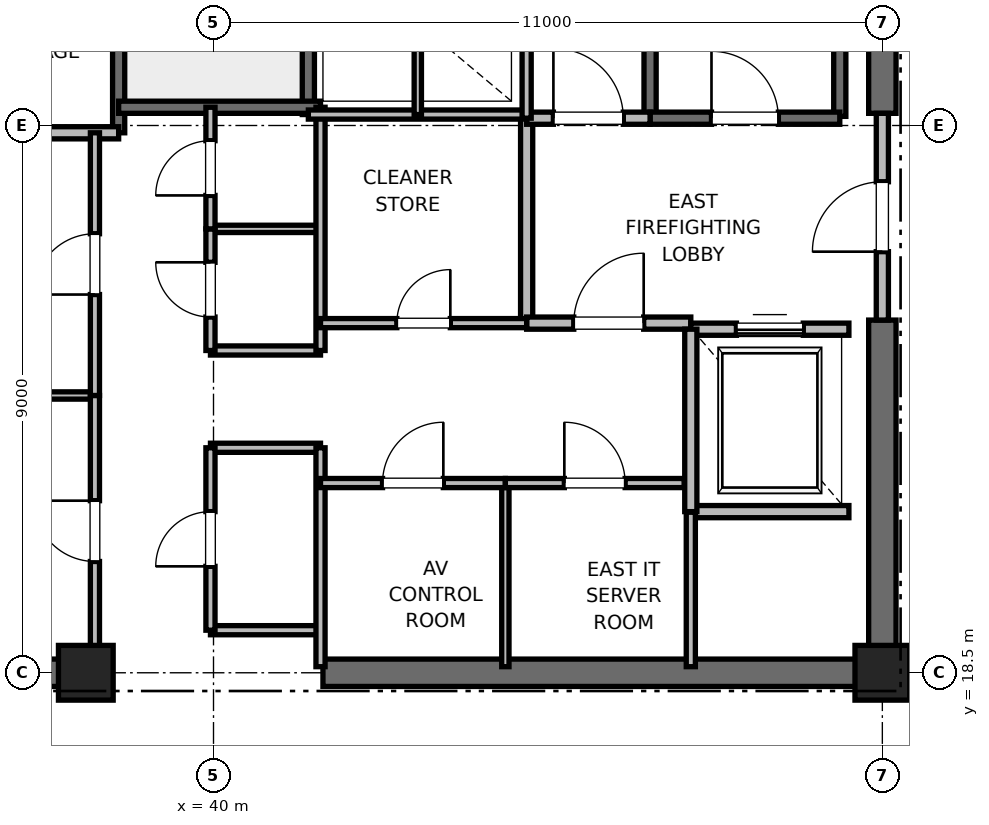
"""IFC4 building model, lengths in metres.
Left out: names, types, materials, properties, quantities, classifications, styles, units other than length and angle.
Written with IfcOpenShell. Run it as: python <this file> out.ifc"""

import sys

from ifc_helpers import new_model, si_unit, direction, frame, frame_2d, origin, origin_2d, place, context, subcontext, project, spatial, rectangle, extrude, element, fill, save


model = new_model("IFC4")
c1 = context("Model", 3, precision=1e-05, world=origin(), true_north=direction((0.0, 1.0)))
c2 = subcontext(c1, "Body", "Model", "MODEL_VIEW")
j1 = project(units=[si_unit("LENGTHUNIT", "METRE"), si_unit("PLANEANGLEUNIT", "RADIAN")], contexts=[c1])
p1 = place(None, origin())
s1 = spatial("IfcSite", under=j1, at=p1, CompositionType="ELEMENT")
p2 = place(p1, origin())
s2 = spatial("IfcBuilding", under=s1, at=p2, CompositionType="ELEMENT")
p3 = place(p2, frame((0.0, 0.0, 243.2)))
s3 = spatial("IfcBuildingStorey", under=s2, at=p3, CompositionType="ELEMENT", Elevation=243.2)
for number, where, z_axis, x_axis in (
    (1, (51.0, 18.5, 0.0), (0.0, 0.0, 1.0), (1.0, 0.0, 0.0)),
    (2, (37.9, 18.5, 0.0), (0.0, 0.0, 1.0), (1.0, 0.0, 0.0)),
):
    element("IfcColumn", number, at=place(p3, frame(where, z_axis=z_axis, x_axis=x_axis)), inside=s3, PredefinedType="PILASTER", context=c2, shape_type="SweptSolid", body=[
        extrude(rectangle(XDim=0.9, YDim=0.9, at=origin_2d()), origin(), (0.0, 0.0, 1.0), 4.0),
    ])
for number, where, z_axis, x_axis in (
    (3, (29.0, 18.5, 0.0), (0.0, 0.0, 1.0), (1.0, 0.0, 0.0)),
    (4, (41.8, 18.5, 0.0), (0.0, 0.0, 1.0), (1.0, 0.0, 0.0)),
):
    element("IfcWall", number, at=place(p3, frame(where, z_axis=z_axis, x_axis=x_axis)), inside=s3, PredefinedType="SHEAR", context=c2, shape_type="SweptSolid", body=[
        extrude(rectangle(XDim=9.2, YDim=0.45, at=frame_2d((4.6, 0.0))), origin(), (0.0, 0.0, 1.0), 3.785),
    ])
p4 = place(p3, frame((51.0, 18.5, 0.0), z_axis=(0.0, 0.0, 1.0), x_axis=(0.0, 1.0, 0.0)))
e5 = element("IfcWall", 5, at=p4, inside=s3, PredefinedType="SHEAR", context=c2, shape_type="SweptSolid", body=[
    extrude(rectangle(XDim=5.8, YDim=0.45, at=frame_2d((2.9, 0.0))), origin(), (0.0, 0.0, 1.0), 3.785),
])
p5 = place(p3, frame((51.0, 27.7, 0.0), z_axis=(0.0, 0.0, 1.0), x_axis=(0.0, 1.0, 0.0)))
e6 = element("IfcWall", 6, at=p5, inside=s3, PredefinedType="SHEAR", context=c2, shape_type="SweptSolid", body=[
    extrude(rectangle(XDim=8.8, YDim=0.45, at=frame_2d((4.4, 0.0))), origin(), (0.0, 0.0, 1.0), 3.785),
])
p6 = place(p3, frame((50.3, 27.65, 0.0), z_axis=(0.0, 0.0, 1.0), x_axis=(0.0, 1.0, 0.0)))
e7 = element("IfcWall", 7, at=p6, inside=s3, PredefinedType="SOLIDWALL", context=c2, shape_type="SweptSolid", body=[
    extrude(rectangle(XDim=8.15, YDim=0.2, at=frame_2d((4.075, 0.0))), origin(), (0.0, 0.0, 1.0), 3.785),
])
p7 = place(p3, frame((47.18, 27.62, 0.0), z_axis=(0.0, 0.0, 1.0), x_axis=(0.0, 1.0, 0.0)))
e8 = element("IfcWall", 8, at=p7, inside=s3, PredefinedType="SOLIDWALL", context=c2, shape_type="SweptSolid", body=[
    extrude(rectangle(XDim=8.18, YDim=0.2, at=frame_2d((4.09, 0.0))), origin(), (0.0, 0.0, 1.0), 3.785),
])
p8 = place(p3, frame((47.18, 27.62, 0.0), z_axis=(0.0, 0.0, 1.0), x_axis=(1.0, 0.0, 0.0)))
e9 = element("IfcWall", 9, at=p8, inside=s3, PredefinedType="SOLIDWALL", context=c2, shape_type="SweptSolid", body=[
    extrude(rectangle(XDim=3.12, YDim=0.2, at=frame_2d((1.56, 0.0))), origin(), (0.0, 0.0, 1.0), 3.785),
])
p9 = place(p8, frame((1.01, 0.0, 0.0)))
e10 = element("IfcOpeningElement", 10, at=p9, cuts=e9, PredefinedType="OPENING", context=c2, shape_type="SweptSolid", body=[
    extrude(rectangle(XDim=1.1, YDim=2.15, at=frame_2d((0.55, 1.075))), frame((0.0, 0.1, 0.0), z_axis=(0.0, -1.0, 0.0), x_axis=(1.0, 0.0, 0.0)), (0.0, 0.0, 1.0), 0.2),
])
p10 = place(p3, frame((38.44, 27.38, 0.0), z_axis=(0.0, 0.0, 1.0), x_axis=(0.0, 1.0, 0.0)))
e11 = element("IfcWall", 11, at=p10, inside=s3, PredefinedType="SOLIDWALL", context=c2, shape_type="SweptSolid", body=[
    extrude(rectangle(XDim=8.87, YDim=0.2, at=frame_2d((4.435, 0.0))), origin(), (0.0, 0.0, 1.0), 3.785),
])
p11 = place(p3, frame((41.56, 27.68, 0.0), z_axis=(0.0, 0.0, 1.0), x_axis=(0.0, 1.0, 0.0)))
e12 = element("IfcWall", 12, at=p11, inside=s3, PredefinedType="SOLIDWALL", context=c2, shape_type="SweptSolid", body=[
    extrude(rectangle(XDim=8.57, YDim=0.2, at=frame_2d((4.285, 0.0))), origin(), (0.0, 0.0, 1.0), 3.785),
])
p12 = place(p3, frame((38.44, 27.8, 0.0), z_axis=(0.0, 0.0, 1.0), x_axis=(1.0, 0.0, 0.0)))
e13 = element("IfcWall", 13, at=p12, inside=s3, PredefinedType="SOLIDWALL", context=c2, shape_type="SweptSolid", body=[
    extrude(rectangle(XDim=3.32, YDim=0.2, at=frame_2d((1.66, 0.0))), origin(), (0.0, 0.0, 1.0), 3.785),
])
p13 = place(p3, frame((32.82, 27.38, 0.0), z_axis=(0.0, 0.0, 1.0), x_axis=(1.0, 0.0, 0.0)))
e14 = element("IfcWall", 14, at=p13, inside=s3, PredefinedType="PARTITIONING", context=c2, shape_type="SweptSolid", body=[
    extrude(rectangle(XDim=5.62, YDim=0.2, at=frame_2d((2.81, 0.0))), origin(), (0.0, 0.0, 1.0), 3.785),
])
p14 = place(p3, frame((45.15, 24.25, 0.0), z_axis=(0.0, 0.0, 1.0), x_axis=(0.0, 1.0, 0.0)))
e15 = element("IfcWall", 15, at=p14, inside=s3, PredefinedType="PARTITIONING", context=c2, shape_type="SweptSolid", body=[
    extrude(rectangle(XDim=3.37, YDim=0.2, at=frame_2d((1.685, 0.0))), origin(), (0.0, 0.0, 1.0), 3.785),
])
p15 = place(p3, frame((45.15, 24.25, 0.0), z_axis=(0.0, 0.0, 1.0), x_axis=(1.0, 0.0, 0.0)))
e16 = element("IfcWall", 16, at=p15, inside=s3, PredefinedType="PARTITIONING", context=c2, shape_type="SweptSolid", body=[
    extrude(rectangle(XDim=2.7, YDim=0.2, at=frame_2d((1.35, 0.0))), origin(), (0.0, 0.0, 1.0), 3.785),
])
p16 = place(p15, frame((0.775, 0.0, 0.0)))
e17 = element("IfcOpeningElement", 17, at=p16, cuts=e16, PredefinedType="OPENING", context=c2, shape_type="SweptSolid", body=[
    extrude(rectangle(XDim=1.15, YDim=2.2, at=frame_2d((0.575, 1.1))), frame((0.0, 0.1, 0.0), z_axis=(0.0, -1.0, 0.0), x_axis=(1.0, 0.0, 0.0)), (0.0, 0.0, 1.0), 0.2),
])
p17 = place(p3, frame((45.15, 27.62, 0.0), z_axis=(0.0, 0.0, 1.0), x_axis=(1.0, 0.0, 0.0)))
e18 = element("IfcWall", 18, at=p17, inside=s3, PredefinedType="PARTITIONING", context=c2, shape_type="SweptSolid", body=[
    extrude(rectangle(XDim=2.03, YDim=0.2, at=frame_2d((1.015, 0.0))), origin(), (0.0, 0.0, 1.0), 3.785),
])
p18 = place(p17, frame((0.44, 0.0, 0.0)))
e19 = element("IfcOpeningElement", 19, at=p18, cuts=e18, PredefinedType="OPENING", context=c2, shape_type="SweptSolid", body=[
    extrude(rectangle(XDim=1.15, YDim=2.2, at=frame_2d((0.575, 1.1))), frame((0.0, 0.1, 0.0), z_axis=(0.0, -1.0, 0.0), x_axis=(1.0, 0.0, 0.0)), (0.0, 0.0, 1.0), 0.2),
])
p19 = place(p3, frame((51.0, 24.3, 0.0), z_axis=(0.0, 0.0, 1.0), x_axis=(0.0, 1.0, 0.0)))
e20 = element("IfcWall", 20, at=p19, inside=s3, PredefinedType="PARTITIONING", context=c2, shape_type="SweptSolid", body=[
    extrude(rectangle(XDim=3.4, YDim=0.2, at=frame_2d((1.7, 0.0))), origin(), (0.0, 0.0, 1.0), 2.865),
])
p20 = place(p19, frame((1.125, 0.0, 0.0)))
e21 = element("IfcOpeningElement", 21, at=p20, cuts=e20, PredefinedType="OPENING", context=c2, shape_type="SweptSolid", body=[
    extrude(rectangle(XDim=1.15, YDim=2.2, at=frame_2d((0.575, 1.1))), frame((0.0, 0.1, 0.0), z_axis=(0.0, -1.0, 0.0), x_axis=(1.0, 0.0, 0.0)), (0.0, 0.0, 1.0), 0.2),
])
p21 = place(p3, frame((47.85, 21.15, 0.0), z_axis=(0.0, 0.0, 1.0), x_axis=(1.0, 0.0, 0.0)))
e22 = element("IfcWall", 22, at=p21, inside=s3, PredefinedType="SOLIDWALL", context=c2, shape_type="SweptSolid", body=[
    extrude(rectangle(XDim=2.6, YDim=0.2, at=frame_2d((1.3, 0.0))), origin(), (0.0, 0.0, 1.0), 3.785),
])
p22 = place(p3, frame((50.45, 24.15, 0.0), z_axis=(0.0, 0.0, 1.0), x_axis=(-1.0, 0.0, 0.0)))
e23 = element("IfcWall", 23, at=p22, inside=s3, PredefinedType="SOLIDWALL", context=c2, shape_type="SweptSolid", body=[
    extrude(rectangle(XDim=2.6, YDim=0.2, at=frame_2d((1.3, 0.0))), origin(), (0.0, 0.0, 1.0), 2.865),
])
p23 = place(p22, frame((0.75, 0.0, 0.0)))
e24 = element("IfcOpeningElement", 24, at=p23, cuts=e23, PredefinedType="OPENING", context=c2, shape_type="SweptSolid", body=[
    extrude(rectangle(XDim=1.1, YDim=2.2, at=frame_2d((0.55, 1.1))), frame((0.0, 0.1, 0.0), z_axis=(0.0, -1.0, 0.0), x_axis=(1.0, 0.0, 0.0)), (0.0, 0.0, 1.0), 0.2),
])
p24 = place(p3, frame((47.85, 24.15, 0.0), z_axis=(0.0, 0.0, 1.0), x_axis=(0.0, -1.0, 0.0)))
e25 = element("IfcWall", 25, at=p24, inside=s3, PredefinedType="SOLIDWALL", context=c2, shape_type="SweptSolid", body=[
    extrude(rectangle(XDim=3.0, YDim=0.2, at=frame_2d((1.5, 0.0))), origin(), (0.0, 0.0, 1.0), 3.785),
])
for number, where, z_axis, x_axis in (
    (26, (39.95, 19.2, 0.0), (0.0, 0.0, 1.0), (1.0, 0.0, 0.0)),
    (27, (39.95, 22.2, 0.0), (0.0, 0.0, 1.0), (1.0, 0.0, 0.0)),
    (28, (39.95, 23.8, 0.0), (0.0, 0.0, 1.0), (1.0, 0.0, 0.0)),
):
    element("IfcWall", number, at=place(p3, frame(where, z_axis=z_axis, x_axis=x_axis)), inside=s3, PredefinedType="PARTITIONING", context=c2, shape_type="SweptSolid", body=[
        extrude(rectangle(XDim=1.81, YDim=0.15, at=frame_2d((0.905, 0.0))), origin(), (0.0, 0.0, 1.0), 2.85),
    ])
p25 = place(p3, frame((39.95, 25.8, 0.0), z_axis=(0.0, 0.0, 1.0), x_axis=(1.0, 0.0, 0.0)))
e29 = element("IfcWall", 29, at=p25, inside=s3, PredefinedType="PARTITIONING", context=c2, shape_type="SweptSolid", body=[
    extrude(rectangle(XDim=1.81, YDim=0.12, at=frame_2d((0.905, 0.0))), origin(), (0.0, 0.0, 1.0), 2.85),
])
p26 = place(p3, frame((41.76, 18.6, 0.0), z_axis=(0.0, 0.0, 1.0), x_axis=(0.0, 1.0, 0.0)))
e30 = element("IfcWall", 30, at=p26, inside=s3, PredefinedType="PARTITIONING", context=c2, shape_type="SweptSolid", body=[
    extrude(rectangle(XDim=3.6, YDim=0.15, at=frame_2d((1.8, 0.0))), origin(), (0.0, 0.0, 1.0), 2.85),
])
p27 = place(p3, frame((41.76, 23.8, 0.0), z_axis=(0.0, 0.0, 1.0), x_axis=(0.0, 1.0, 0.0)))
e31 = element("IfcWall", 31, at=p27, inside=s3, PredefinedType="PARTITIONING", context=c2, shape_type="SweptSolid", body=[
    extrude(rectangle(XDim=4.0, YDim=0.15, at=frame_2d((2.0, 0.0))), origin(), (0.0, 0.0, 1.0), 2.85),
])
p28 = place(p3, frame((39.95, 19.2, 0.0), z_axis=(0.0, 0.0, 1.0), x_axis=(0.0, 1.0, 0.0)))
e32 = element("IfcWall", 32, at=p28, inside=s3, PredefinedType="PARTITIONING", context=c2, shape_type="SweptSolid", body=[
    extrude(rectangle(XDim=3.0, YDim=0.15, at=frame_2d((1.5, 0.0))), origin(), (0.0, 0.0, 1.0), 2.85),
])
p29 = place(p28, frame((1.05, 0.0, 0.0)))
e33 = element("IfcOpeningElement", 33, at=p29, cuts=e32, PredefinedType="OPENING", context=c2, shape_type="SweptSolid", body=[
    extrude(rectangle(XDim=0.9, YDim=2.1, at=frame_2d((0.45, 1.05))), frame((0.0, 0.075, 0.0), z_axis=(0.0, -1.0, 0.0), x_axis=(1.0, 0.0, 0.0)), (0.0, 0.0, 1.0), 0.15),
])
p30 = place(p3, frame((39.95, 23.8, 0.0), z_axis=(0.0, 0.0, 1.0), x_axis=(0.0, 1.0, 0.0)))
e34 = element("IfcWall", 34, at=p30, inside=s3, PredefinedType="PARTITIONING", context=c2, shape_type="SweptSolid", body=[
    extrude(rectangle(XDim=2.0, YDim=0.15, at=frame_2d((1.0, 0.0))), origin(), (0.0, 0.0, 1.0), 2.85),
])
p31 = place(p30, frame((0.55, 0.0, 0.0)))
e35 = element("IfcOpeningElement", 35, at=p31, cuts=e34, PredefinedType="OPENING", context=c2, shape_type="SweptSolid", body=[
    extrude(rectangle(XDim=0.9, YDim=2.1, at=frame_2d((0.45, 1.05))), frame((0.0, 0.075, 0.0), z_axis=(0.0, -1.0, 0.0), x_axis=(1.0, 0.0, 0.0)), (0.0, 0.0, 1.0), 0.15),
])
p32 = place(p3, frame((39.95, 25.8, 0.0), z_axis=(0.0, 0.0, 1.0), x_axis=(0.0, 1.0, 0.0)))
e36 = element("IfcWall", 36, at=p32, inside=s3, PredefinedType="PARTITIONING", context=c2, shape_type="SweptSolid", body=[
    extrude(rectangle(XDim=2.0, YDim=0.15, at=frame_2d((1.0, 0.0))), origin(), (0.0, 0.0, 1.0), 2.85),
])
p33 = place(p32, frame((0.55, 0.0, 0.0)))
e37 = element("IfcOpeningElement", 37, at=p33, cuts=e36, PredefinedType="OPENING", context=c2, shape_type="SweptSolid", body=[
    extrude(rectangle(XDim=0.9, YDim=2.1, at=frame_2d((0.45, 1.05))), frame((0.0, 0.075, 0.0), z_axis=(0.0, -1.0, 0.0), x_axis=(1.0, 0.0, 0.0)), (0.0, 0.0, 1.0), 0.15),
])
p34 = place(p3, frame((32.82, 23.06, 0.0), z_axis=(0.0, 0.0, 1.0), x_axis=(1.0, 0.0, 0.0)))
e38 = element("IfcWall", 38, at=p34, inside=s3, PredefinedType="PARTITIONING", context=c2, shape_type="SweptSolid", body=[
    extrude(rectangle(XDim=5.23, YDim=0.12, at=frame_2d((2.615, 0.0))), origin(), (0.0, 0.0, 1.0), 2.85),
])
p35 = place(p3, frame((38.05, 18.6, 0.0), z_axis=(0.0, 0.0, 1.0), x_axis=(0.0, 1.0, 0.0)))
e39 = element("IfcWall", 39, at=p35, inside=s3, PredefinedType="PARTITIONING", context=c2, shape_type="SweptSolid", body=[
    extrude(rectangle(XDim=4.46, YDim=0.15, at=frame_2d((2.23, 0.0))), origin(), (0.0, 0.0, 1.0), 2.85),
])
p36 = place(p35, frame((1.73, 0.0, 0.0)))
e40 = element("IfcOpeningElement", 40, at=p36, cuts=e39, PredefinedType="OPENING", context=c2, shape_type="SweptSolid", body=[
    extrude(rectangle(XDim=1.0, YDim=2.15, at=frame_2d((0.5, 1.075))), frame((0.0, 0.075, 0.0), z_axis=(0.0, -1.0, 0.0), x_axis=(1.0, 0.0, 0.0)), (0.0, 0.0, 1.0), 0.15),
])
p37 = place(p3, frame((38.05, 23.06, 0.0), z_axis=(0.0, 0.0, 1.0), x_axis=(0.0, 1.0, 0.0)))
e41 = element("IfcWall", 41, at=p37, inside=s3, PredefinedType="PARTITIONING", context=c2, shape_type="SweptSolid", body=[
    extrude(rectangle(XDim=4.32, YDim=0.15, at=frame_2d((2.16, 0.0))), origin(), (0.0, 0.0, 1.0), 2.85),
])
p38 = place(p37, frame((1.66, 0.0, 0.0)))
e42 = element("IfcOpeningElement", 42, at=p38, cuts=e41, PredefinedType="OPENING", context=c2, shape_type="SweptSolid", body=[
    extrude(rectangle(XDim=1.0, YDim=2.15, at=frame_2d((0.5, 1.075))), frame((0.0, 0.075, 0.0), z_axis=(0.0, -1.0, 0.0), x_axis=(1.0, 0.0, 0.0)), (0.0, 0.0, 1.0), 0.15),
])
p39 = place(p3, frame((41.56, 27.68, 0.0), z_axis=(0.0, 0.0, 1.0), x_axis=(1.0, 0.0, 0.0)))
e43 = element("IfcWall", 43, at=p39, inside=s3, PredefinedType="PARTITIONING", context=c2, shape_type="SweptSolid", body=[
    extrude(rectangle(XDim=3.59, YDim=0.15, at=frame_2d((1.795, 0.0))), origin(), (0.0, 0.0, 1.0), 2.85),
])
p40 = place(p3, frame((47.85, 18.6, 0.0), z_axis=(0.0, 0.0, 1.0), x_axis=(0.0, 1.0, 0.0)))
e44 = element("IfcWall", 44, at=p40, inside=s3, PredefinedType="PARTITIONING", context=c2, shape_type="SweptSolid", body=[
    extrude(rectangle(XDim=2.54, YDim=0.15, at=frame_2d((1.27, 0.0))), origin(), (0.0, 0.0, 1.0), 2.85),
])
p41 = place(p3, frame((44.8, 18.6, 0.0), z_axis=(0.0, 0.0, 1.0), x_axis=(0.0, 1.0, 0.0)))
e45 = element("IfcWall", 45, at=p41, inside=s3, PredefinedType="PARTITIONING", context=c2, shape_type="SweptSolid", body=[
    extrude(rectangle(XDim=3.02, YDim=0.12, at=frame_2d((1.51, 0.0))), origin(), (0.0, 0.0, 1.0), 2.85),
])
p42 = place(p3, frame((41.76, 21.62, 0.0), z_axis=(0.0, 0.0, 1.0), x_axis=(1.0, 0.0, 0.0)))
e46 = element("IfcWall", 46, at=p42, inside=s3, PredefinedType="PARTITIONING", context=c2, shape_type="SweptSolid", body=[
    extrude(rectangle(XDim=3.04, YDim=0.15, at=frame_2d((1.52, 0.0))), origin(), (0.0, 0.0, 1.0), 2.85),
])
p43 = place(p42, frame((1.02, 0.0, 0.0)))
e47 = element("IfcOpeningElement", 47, at=p43, cuts=e46, PredefinedType="OPENING", context=c2, shape_type="SweptSolid", body=[
    extrude(rectangle(XDim=1.0, YDim=2.15, at=frame_2d((0.5, 1.075))), frame((0.0, 0.075, 0.0), z_axis=(0.0, -1.0, 0.0), x_axis=(1.0, 0.0, 0.0)), (0.0, 0.0, 1.0), 0.15),
])
p44 = place(p3, frame((44.8, 21.62, 0.0), z_axis=(0.0, 0.0, 1.0), x_axis=(1.0, 0.0, 0.0)))
e48 = element("IfcWall", 48, at=p44, inside=s3, PredefinedType="PARTITIONING", context=c2, shape_type="SweptSolid", body=[
    extrude(rectangle(XDim=2.94, YDim=0.15, at=frame_2d((1.47, 0.0))), origin(), (0.0, 0.0, 1.0), 2.85),
])
p45 = place(p44, frame((0.97, 0.0, 0.0)))
e49 = element("IfcOpeningElement", 49, at=p45, cuts=e48, PredefinedType="OPENING", context=c2, shape_type="SweptSolid", body=[
    extrude(rectangle(XDim=1.0, YDim=2.15, at=frame_2d((0.5, 1.075))), frame((0.0, 0.075, 0.0), z_axis=(0.0, -1.0, 0.0), x_axis=(1.0, 0.0, 0.0)), (0.0, 0.0, 1.0), 0.15),
])
p46 = place(p3, frame((41.76, 24.25, 0.0), z_axis=(0.0, 0.0, 1.0), x_axis=(1.0, 0.0, 0.0)))
e50 = element("IfcWall", 50, at=p46, inside=s3, PredefinedType="PARTITIONING", context=c2, shape_type="SweptSolid", body=[
    extrude(rectangle(XDim=3.39, YDim=0.15, at=frame_2d((1.695, 0.0))), origin(), (0.0, 0.0, 1.0), 2.85),
])
p47 = place(p46, frame((1.255, 0.0, 0.0)))
e51 = element("IfcOpeningElement", 51, at=p47, cuts=e50, PredefinedType="OPENING", context=c2, shape_type="SweptSolid", body=[
    extrude(rectangle(XDim=0.88, YDim=2.1, at=frame_2d((0.44, 1.05))), frame((0.0, 0.075, 0.0), z_axis=(0.0, -1.0, 0.0), x_axis=(1.0, 0.0, 0.0)), (0.0, 0.0, 1.0), 0.15),
])
p48 = place(p3, frame((45.15, 27.62, 0.0), z_axis=(0.0, 0.0, 1.0), x_axis=(0.0, 1.0, 0.0)))
e52 = element("IfcWall", 52, at=p48, inside=s3, PredefinedType="PARTITIONING", context=c2, shape_type="SweptSolid", body=[
    extrude(rectangle(XDim=3.1, YDim=0.15, at=frame_2d((1.55, 0.0))), origin(), (0.0, 0.0, 1.0), 2.85),
])
p49 = place(p3, frame((43.36, 27.68, 0.0), z_axis=(0.0, 0.0, 1.0), x_axis=(0.0, 1.0, 0.0)))
e53 = element("IfcWall", 53, at=p49, inside=s3, PredefinedType="PARTITIONING", context=c2, shape_type="SweptSolid", body=[
    extrude(rectangle(XDim=3.04, YDim=0.12, at=frame_2d((1.52, 0.0))), origin(), (0.0, 0.0, 1.0), 2.85),
])
p50 = place(p9, origin())
e54 = element("IfcDoor", 54, at=p50, inside=s3, OperationType="SINGLE_SWING_LEFT", PredefinedType="DOOR", context=c2, shape_type="SweptSolid", body=[
    extrude(rectangle(XDim=1.1, YDim=2.15, at=frame_2d((0.55, 1.075))), frame((0.0, 0.025, 0.0), z_axis=(0.0, -1.0, 0.0), x_axis=(1.0, 0.0, 0.0)), (0.0, 0.0, 1.0), 0.05),
])
fill(e10, e54)
p51 = place(p16, origin())
e55 = element("IfcDoor", 55, at=p51, inside=s3, OperationType="SINGLE_SWING_RIGHT", PredefinedType="DOOR", context=c2, shape_type="SweptSolid", body=[
    extrude(rectangle(XDim=1.15, YDim=2.2, at=frame_2d((0.575, 1.1))), frame((0.0, 0.025, 0.0), z_axis=(0.0, -1.0, 0.0), x_axis=(1.0, 0.0, 0.0)), (0.0, 0.0, 1.0), 0.05),
])
fill(e17, e55)
p52 = place(p18, origin())
e56 = element("IfcDoor", 56, at=p52, inside=s3, OperationType="SINGLE_SWING_LEFT", PredefinedType="DOOR", context=c2, shape_type="SweptSolid", body=[
    extrude(rectangle(XDim=1.15, YDim=2.2, at=frame_2d((0.575, 1.1))), frame((0.0, 0.025, 0.0), z_axis=(0.0, -1.0, 0.0), x_axis=(1.0, 0.0, 0.0)), (0.0, 0.0, 1.0), 0.05),
])
fill(e19, e56)
p53 = place(p20, origin())
e57 = element("IfcDoor", 57, at=p53, inside=s3, OperationType="SINGLE_SWING_LEFT", PredefinedType="DOOR", context=c2, shape_type="SweptSolid", body=[
    extrude(rectangle(XDim=1.15, YDim=2.2, at=frame_2d((0.575, 1.1))), frame((0.0, 0.025, 0.0), z_axis=(0.0, -1.0, 0.0), x_axis=(1.0, 0.0, 0.0)), (0.0, 0.0, 1.0), 0.05),
])
fill(e21, e57)
p54 = place(p23, origin())
e58 = element("IfcDoor", 58, at=p54, inside=s3, OperationType="SLIDING_TO_RIGHT", PredefinedType="DOOR", context=c2, shape_type="SweptSolid", body=[
    extrude(rectangle(XDim=1.1, YDim=2.2, at=frame_2d((0.55, 1.1))), frame((0.0, 0.025, 0.0), z_axis=(0.0, -1.0, 0.0), x_axis=(1.0, 0.0, 0.0)), (0.0, 0.0, 1.0), 0.05),
])
fill(e24, e58)
p55 = place(p29, origin())
e59 = element("IfcDoor", 59, at=p55, inside=s3, OperationType="SINGLE_SWING_LEFT", PredefinedType="DOOR", context=c2, shape_type="SweptSolid", body=[
    extrude(rectangle(XDim=0.9, YDim=2.1, at=frame_2d((0.45, 1.05))), frame((0.0, 0.025, 0.0), z_axis=(0.0, -1.0, 0.0), x_axis=(1.0, 0.0, 0.0)), (0.0, 0.0, 1.0), 0.05),
])
fill(e33, e59)
p56 = place(p31, origin())
e60 = element("IfcDoor", 60, at=p56, inside=s3, OperationType="SINGLE_SWING_RIGHT", PredefinedType="DOOR", context=c2, shape_type="SweptSolid", body=[
    extrude(rectangle(XDim=0.9, YDim=2.1, at=frame_2d((0.45, 1.05))), frame((0.0, 0.025, 0.0), z_axis=(0.0, -1.0, 0.0), x_axis=(1.0, 0.0, 0.0)), (0.0, 0.0, 1.0), 0.05),
])
fill(e35, e60)
p57 = place(p33, origin())
e61 = element("IfcDoor", 61, at=p57, inside=s3, OperationType="SINGLE_SWING_LEFT", PredefinedType="DOOR", context=c2, shape_type="SweptSolid", body=[
    extrude(rectangle(XDim=0.9, YDim=2.1, at=frame_2d((0.45, 1.05))), frame((0.0, 0.025, 0.0), z_axis=(0.0, -1.0, 0.0), x_axis=(1.0, 0.0, 0.0)), (0.0, 0.0, 1.0), 0.05),
])
fill(e37, e61)
p58 = place(p36, origin())
e62 = element("IfcDoor", 62, at=p58, inside=s3, OperationType="SINGLE_SWING_RIGHT", PredefinedType="DOOR", context=c2, shape_type="SweptSolid", body=[
    extrude(rectangle(XDim=1.0, YDim=2.15, at=frame_2d((0.5, 1.075))), frame((0.0, 0.025, 0.0), z_axis=(0.0, -1.0, 0.0), x_axis=(1.0, 0.0, 0.0)), (0.0, 0.0, 1.0), 0.05),
])
fill(e40, e62)
p59 = place(p38, origin())
e63 = element("IfcDoor", 63, at=p59, inside=s3, OperationType="SINGLE_SWING_LEFT", PredefinedType="DOOR", context=c2, shape_type="SweptSolid", body=[
    extrude(rectangle(XDim=1.0, YDim=2.15, at=frame_2d((0.5, 1.075))), frame((0.0, 0.025, 0.0), z_axis=(0.0, -1.0, 0.0), x_axis=(1.0, 0.0, 0.0)), (0.0, 0.0, 1.0), 0.05),
])
fill(e42, e63)
p60 = place(p43, origin())
e64 = element("IfcDoor", 64, at=p60, inside=s3, OperationType="SINGLE_SWING_RIGHT", PredefinedType="DOOR", context=c2, shape_type="SweptSolid", body=[
    extrude(rectangle(XDim=1.0, YDim=2.15, at=frame_2d((0.5, 1.075))), frame((0.0, 0.025, 0.0), z_axis=(0.0, -1.0, 0.0), x_axis=(1.0, 0.0, 0.0)), (0.0, 0.0, 1.0), 0.05),
])
fill(e47, e64)
p61 = place(p45, origin())
e65 = element("IfcDoor", 65, at=p61, inside=s3, OperationType="SINGLE_SWING_LEFT", PredefinedType="DOOR", context=c2, shape_type="SweptSolid", body=[
    extrude(rectangle(XDim=1.0, YDim=2.15, at=frame_2d((0.5, 1.075))), frame((0.0, 0.025, 0.0), z_axis=(0.0, -1.0, 0.0), x_axis=(1.0, 0.0, 0.0)), (0.0, 0.0, 1.0), 0.05),
])
fill(e49, e65)
p62 = place(p47, origin())
e66 = element("IfcDoor", 66, at=p62, inside=s3, OperationType="SINGLE_SWING_RIGHT", PredefinedType="DOOR", context=c2, shape_type="SweptSolid", body=[
    extrude(rectangle(XDim=0.88, YDim=2.1, at=frame_2d((0.44, 1.05))), frame((0.0, 0.025, 0.0), z_axis=(0.0, -1.0, 0.0), x_axis=(1.0, 0.0, 0.0)), (0.0, 0.0, 1.0), 0.05),
])
fill(e51, e66)
save(model, sys.argv[1])
